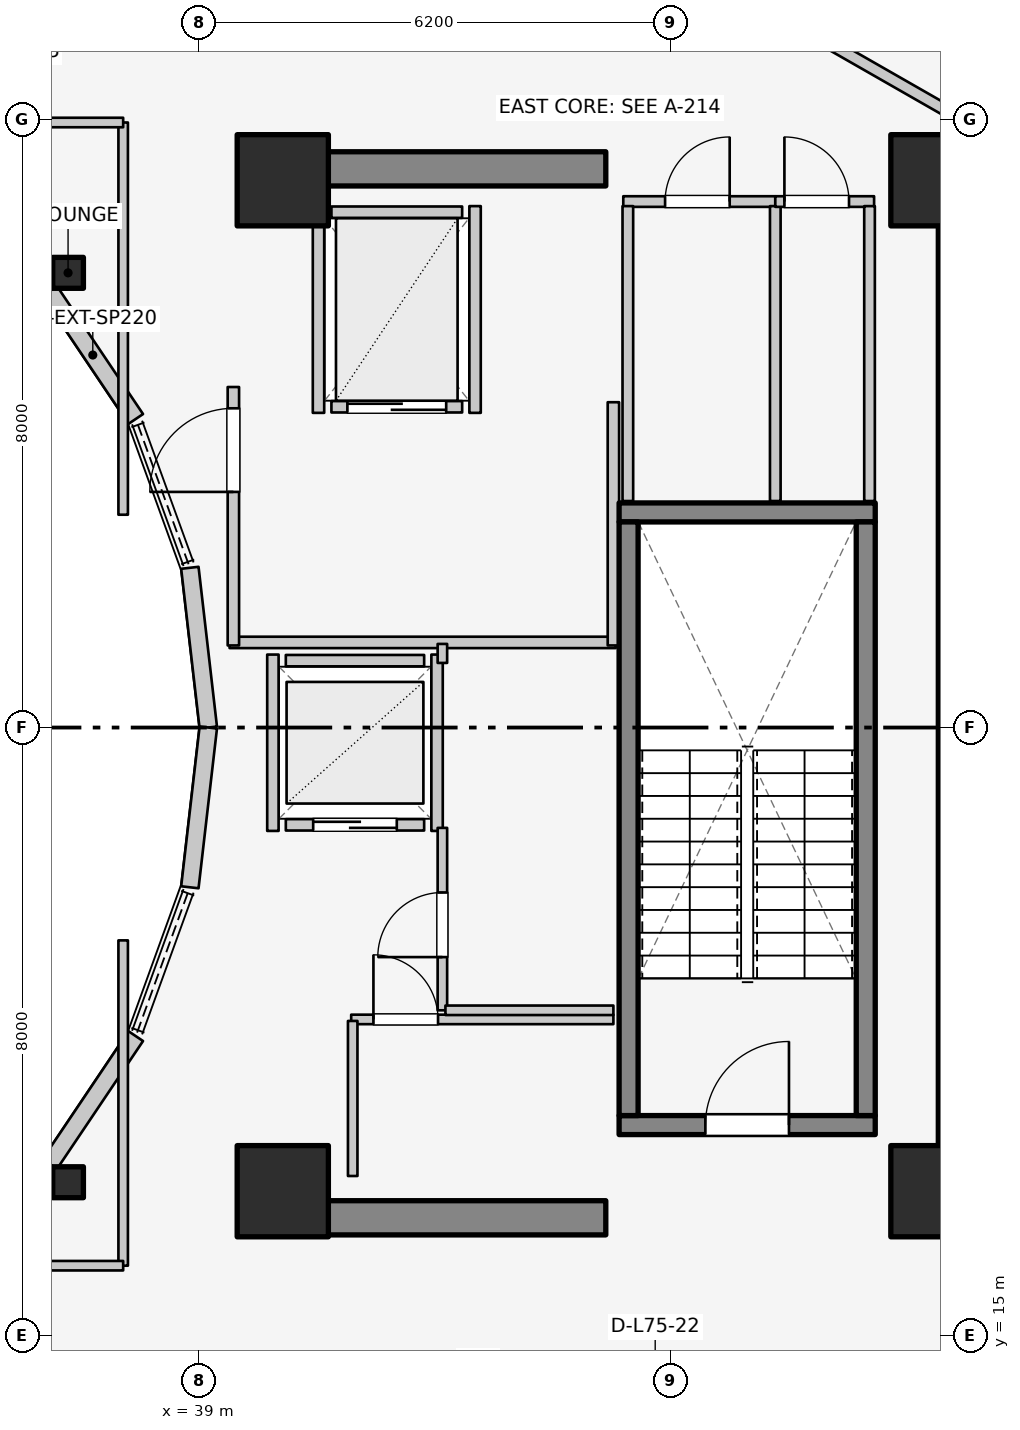
"""IFC4 building model, lengths in metres.
Left out: names, types, materials, properties, quantities, classifications, styles, units other than length and angle.
Written with IfcOpenShell. Run it as: python <this file> out.ifc"""

import sys

from ifc_helpers import new_model, si_unit, direction, frame, frame_2d, origin, origin_2d, place, context, subcontext, project, spatial, rectangle, i_section, extrude, element, fill, save


model = new_model("IFC4")
c1 = context("Model", 3, precision=1e-05, world=origin(), true_north=direction((0.0, 1.0)))
c2 = subcontext(c1, "Body", "Model", "MODEL_VIEW")
j1 = project(units=[si_unit("LENGTHUNIT", "METRE"), si_unit("PLANEANGLEUNIT", "RADIAN")], contexts=[c1])
p1 = place(None, origin())
s1 = spatial("IfcSite", under=j1, at=p1, CompositionType="ELEMENT")
p2 = place(p1, origin())
s2 = spatial("IfcBuilding", under=s1, at=p2, CompositionType="ELEMENT")
p3 = place(p2, frame((0.0, 0.0, 246.0)))
s3 = spatial("IfcBuildingStorey", under=s2, at=p3, CompositionType="ELEMENT", Elevation=246.0)
p4 = place(p3, frame((48.95, 17.05, 0.0), z_axis=(0.0, 0.0, 1.0), x_axis=(0.0, 1.0, 0.0)))
e1 = element("IfcWall", 1, at=p4, inside=s3, PredefinedType="SHEAR", context=c2, shape_type="SweptSolid", body=[
    extrude(rectangle(XDim=12.8, YDim=0.45, at=frame_2d((6.4, 0.0))), origin(), (0.0, 0.0, 1.0), 3.6),
])
for number, where, z_axis, x_axis in (
    (2, (39.85, 16.55, 0.0), (0.0, 0.0, 1.0), (1.0, 0.0, 0.0)),
    (3, (39.85, 30.35, 0.0), (0.0, 0.0, 1.0), (1.0, 0.0, 0.0)),
):
    element("IfcWall", number, at=place(p3, frame(where, z_axis=z_axis, x_axis=x_axis)), inside=s3, PredefinedType="SHEAR", context=c2, shape_type="SweptSolid", body=[
        extrude(rectangle(XDim=4.5, YDim=0.45, at=frame_2d((2.25, 0.0))), origin(), (0.0, 0.0, 1.0), 3.6),
    ])
p5 = place(p3, frame((44.525, 17.77, 0.0), z_axis=(0.0, 0.0, 1.0), x_axis=(1.0, 0.0, 0.0)))
e4 = element("IfcWall", 4, at=p5, inside=s3, PredefinedType="SOLIDWALL", context=c2, shape_type="SweptSolid", body=[
    extrude(rectangle(XDim=3.37, YDim=0.25, at=frame_2d((1.685, 0.0))), origin(), (0.0, 0.0, 1.0), 3.6),
])
p6 = place(p5, frame((1.135, 0.0, 0.0)))
e5 = element("IfcOpeningElement", 5, at=p6, cuts=e4, PredefinedType="OPENING", context=c2, shape_type="SweptSolid", body=[
    extrude(rectangle(XDim=1.1, YDim=2.1, at=frame_2d((0.55, 1.05))), frame((0.0, 0.135, 0.0), z_axis=(0.0, -1.0, 0.0), x_axis=(1.0, 0.0, 0.0)), (0.0, 0.0, 1.0), 0.27),
])
p7 = place(p3, frame((44.525, 25.83, 0.0), z_axis=(0.0, 0.0, 1.0), x_axis=(1.0, 0.0, 0.0)))
e6 = element("IfcWall", 6, at=p7, inside=s3, PredefinedType="SOLIDWALL", context=c2, shape_type="SweptSolid", body=[
    extrude(rectangle(XDim=3.37, YDim=0.25, at=frame_2d((1.685, 0.0))), origin(), (0.0, 0.0, 1.0), 3.6),
])
for number, where, z_axis, x_axis in (
    (7, (44.65, 17.895, 0.0), (0.0, 0.0, 1.0), (0.0, 1.0, 0.0)),
    (8, (47.77, 17.895, 0.0), (0.0, 0.0, 1.0), (0.0, 1.0, 0.0)),
):
    element("IfcWall", number, at=place(p3, frame(where, z_axis=z_axis, x_axis=x_axis)), inside=s3, PredefinedType="SOLIDWALL", context=c2, shape_type="SweptSolid", body=[
        extrude(rectangle(XDim=7.81, YDim=0.25, at=frame_2d((3.905, 0.0))), origin(), (0.0, 0.0, 1.0), 3.6),
    ])
for number, where, z_axis, x_axis in (
    (9, (40.1, 16.9, 0.0), (0.0, 0.0, 1.0), (1.0, 0.0, 0.0)),
    (10, (48.7, 16.9, 0.0), (0.0, 0.0, 1.0), (1.0, 0.0, 0.0)),
    (11, (48.7, 30.2, 0.0), (0.0, 0.0, 1.0), (1.0, 0.0, 0.0)),
    (12, (40.1, 30.2, 0.0), (0.0, 0.0, 1.0), (1.0, 0.0, 0.0)),
):
    element("IfcColumn", number, at=place(p3, frame(where, z_axis=z_axis, x_axis=x_axis)), inside=s3, PredefinedType="COLUMN", context=c2, shape_type="SweptSolid", body=[
        extrude(rectangle(XDim=1.2, YDim=1.2, at=origin_2d()), origin(), (0.0, 0.0, 1.0), 3.6),
    ])
for number, where, z_axis, x_axis in (
    (13, (37.275, 28.982, 0.0), (0.0, 0.0, 1.0), (1.0, 0.0, 0.0)),
    (14, (37.275, 17.018, 0.0), (0.0, 0.0, 1.0), (1.0, 0.0, 0.0)),
):
    element("IfcColumn", number, at=place(p3, frame(where, z_axis=z_axis, x_axis=x_axis)), inside=s3, PredefinedType="COLUMN", context=c2, shape_type="SweptSolid", body=[
        extrude(i_section(OverallWidth=0.404, OverallDepth=0.407, WebThickness=0.027, FlangeThickness=0.044, FilletRadius=0.025, at=origin_2d()), origin(), (0.0, 0.0, 1.0), 3.6),
    ])
p8 = place(p3, frame((39.12, 23.0, 0.0), z_axis=(0.0, 0.0, 1.0), x_axis=(-0.114711713601, 0.993398823617, 0.0)))
e15 = element("IfcWall", 15, at=p8, inside=s3, PredefinedType="STANDARD", context=c2, shape_type="SweptSolid", body=[
    extrude(rectangle(XDim=2.115, YDim=0.23, at=frame_2d((1.058, 0.0))), origin(), (0.0, 0.0, 1.0), 3.28),
])
p9 = place(p3, frame((38.166, 27.06, 0.0), z_axis=(0.0, 0.0, 1.0), x_axis=(-0.558197800898, 0.829707909492, 0.0)))
e16 = element("IfcWall", 16, at=p9, inside=s3, PredefinedType="STANDARD", context=c2, shape_type="SweptSolid", body=[
    extrude(rectangle(XDim=2.027, YDim=0.23, at=frame_2d((1.013, 0.0))), origin(), (0.0, 0.0, 1.0), 2.6),
])
for number, where, z_axis, x_axis in (
    (17, (37.035, 28.742, 0.0), (0.0, 0.0, 1.0), (-0.753, 0.659, 0.0)),
    (18, (35.56, 15.968, 0.0), (0.0, 0.0, 1.0), (0.753, 0.659, 0.0)),
):
    element("IfcWall", number, at=place(p3, frame(where, z_axis=z_axis, x_axis=x_axis)), inside=s3, PredefinedType="STANDARD", context=c2, shape_type="SweptSolid", body=[
        extrude(rectangle(XDim=1.959, YDim=0.23, at=frame_2d((0.98, 0.0))), origin(), (0.0, 0.0, 1.0), 2.6),
    ])
p10 = place(p3, frame((37.035, 17.258, 0.0), z_axis=(0.0, 0.0, 1.0), x_axis=(0.558197800898, 0.829707909492, 0.0)))
e19 = element("IfcWall", 19, at=p10, inside=s3, PredefinedType="STANDARD", context=c2, shape_type="SweptSolid", body=[
    extrude(rectangle(XDim=2.027, YDim=0.23, at=frame_2d((1.013, 0.0))), origin(), (0.0, 0.0, 1.0), 2.6),
])
p11 = place(p3, frame((38.877, 20.898, 0.0), z_axis=(0.0, 0.0, 1.0), x_axis=(0.114711713601, 0.993398823617, 0.0)))
e20 = element("IfcWall", 20, at=p11, inside=s3, PredefinedType="STANDARD", context=c2, shape_type="SweptSolid", body=[
    extrude(rectangle(XDim=2.115, YDim=0.23, at=frame_2d((1.058, 0.0))), origin(), (0.0, 0.0, 1.0), 3.28),
])
p12 = place(p3, frame((50.761, 31.829, 0.0), z_axis=(0.0, 0.0, 1.0), x_axis=(-0.759587504333, 0.650405122413, 0.0)))
e21 = element("IfcWall", 21, at=p12, inside=s3, PredefinedType="STANDARD", context=c2, shape_type="SweptSolid", body=[
    extrude(rectangle(XDim=4.217, YDim=0.26, at=frame_2d((2.109, 0.0))), origin(), (0.0, 0.0, 1.0), 3.29),
])
p13 = place(p12, frame((1.359, 0.0, 0.75)))
e22 = element("IfcOpeningElement", 22, at=p13, cuts=e21, PredefinedType="OPENING", context=c2, shape_type="SweptSolid", body=[
    extrude(rectangle(XDim=1.5, YDim=1.6, at=frame_2d((0.75, 0.8))), frame((0.0, 0.14, 0.0), z_axis=(0.0, -1.0, 0.0), x_axis=(1.0, 0.0, 0.0)), (0.0, 0.0, 1.0), 0.28),
])
p14 = place(p3, frame((40.14, 21.72, 0.0), z_axis=(0.0, 0.0, 1.0), x_axis=(1.0, 0.0, 0.0)))
e23 = element("IfcWall", 23, at=p14, inside=s3, PredefinedType="SOLIDWALL", context=c2, shape_type="SweptSolid", body=[
    extrude(rectangle(XDim=1.82, YDim=0.15, at=frame_2d((0.91, 0.0))), origin(), (0.0, 0.0, 1.0), 2.62),
])
p15 = place(p14, frame((0.36, 0.0, 0.0)))
e24 = element("IfcOpeningElement", 24, at=p15, cuts=e23, PredefinedType="OPENING", context=c2, shape_type="SweptSolid", body=[
    extrude(rectangle(XDim=1.1, YDim=2.1, at=frame_2d((0.55, 1.05))), frame((0.0, 0.085, 0.0), z_axis=(0.0, -1.0, 0.0), x_axis=(1.0, 0.0, 0.0)), (0.0, 0.0, 1.0), 0.17),
])
p16 = place(p3, frame((40.14, 23.88, 0.0), z_axis=(0.0, 0.0, 1.0), x_axis=(1.0, 0.0, 0.0)))
e25 = element("IfcWall", 25, at=p16, inside=s3, PredefinedType="SOLIDWALL", context=c2, shape_type="SweptSolid", body=[
    extrude(rectangle(XDim=1.82, YDim=0.15, at=frame_2d((0.91, 0.0))), origin(), (0.0, 0.0, 1.0), 2.62),
])
p17 = place(p3, frame((39.97, 21.64, 0.0), z_axis=(0.0, 0.0, 1.0), x_axis=(0.0, 1.0, 0.0)))
e26 = element("IfcWall", 26, at=p17, inside=s3, PredefinedType="SOLIDWALL", context=c2, shape_type="SweptSolid", body=[
    extrude(rectangle(XDim=2.32, YDim=0.15, at=frame_2d((1.16, 0.0))), origin(), (0.0, 0.0, 1.0), 2.62),
])
p18 = place(p3, frame((42.13, 21.64, 0.0), z_axis=(0.0, 0.0, 1.0), x_axis=(0.0, 1.0, 0.0)))
e27 = element("IfcWall", 27, at=p18, inside=s3, PredefinedType="SOLIDWALL", context=c2, shape_type="SweptSolid", body=[
    extrude(rectangle(XDim=2.32, YDim=0.15, at=frame_2d((1.16, 0.0))), origin(), (0.0, 0.0, 1.0), 3.295),
])
p19 = place(p3, frame((40.74, 27.22, 0.0), z_axis=(0.0, 0.0, 1.0), x_axis=(1.0, 0.0, 0.0)))
e28 = element("IfcWall", 28, at=p19, inside=s3, PredefinedType="SOLIDWALL", context=c2, shape_type="SweptSolid", body=[
    extrude(rectangle(XDim=1.72, YDim=0.15, at=frame_2d((0.86, 0.0))), origin(), (0.0, 0.0, 1.0), 3.295),
])
p20 = place(p19, frame((0.21, 0.0, 0.0)))
e29 = element("IfcOpeningElement", 29, at=p20, cuts=e28, PredefinedType="OPENING", context=c2, shape_type="SweptSolid", body=[
    extrude(rectangle(XDim=1.3, YDim=2.1, at=frame_2d((0.65, 1.05))), frame((0.0, 0.085, 0.0), z_axis=(0.0, -1.0, 0.0), x_axis=(1.0, 0.0, 0.0)), (0.0, 0.0, 1.0), 0.17),
])
p21 = place(p3, frame((40.74, 29.78, 0.0), z_axis=(0.0, 0.0, 1.0), x_axis=(1.0, 0.0, 0.0)))
e30 = element("IfcWall", 30, at=p21, inside=s3, PredefinedType="SOLIDWALL", context=c2, shape_type="SweptSolid", body=[
    extrude(rectangle(XDim=1.72, YDim=0.15, at=frame_2d((0.86, 0.0))), origin(), (0.0, 0.0, 1.0), 3.295),
])
for number, where, z_axis, x_axis in (
    (31, (40.57, 27.14, 0.0), (0.0, 0.0, 1.0), (0.0, 1.0, 0.0)),
    (32, (42.63, 27.14, 0.0), (0.0, 0.0, 1.0), (0.0, 1.0, 0.0)),
):
    element("IfcWall", number, at=place(p3, frame(where, z_axis=z_axis, x_axis=x_axis)), inside=s3, PredefinedType="SOLIDWALL", context=c2, shape_type="SweptSolid", body=[
        extrude(rectangle(XDim=2.72, YDim=0.15, at=frame_2d((1.36, 0.0))), origin(), (0.0, 0.0, 1.0), 3.295),
    ])
p22 = place(p3, frame((39.4, 24.12, 0.0), z_axis=(0.0, 0.0, 1.0), x_axis=(1.0, 0.0, 0.0)))
e33 = element("IfcWall", 33, at=p22, inside=s3, PredefinedType="PARTITIONING", context=c2, shape_type="SweptSolid", body=[
    extrude(rectangle(XDim=5.08, YDim=0.15, at=frame_2d((2.54, 0.0))), origin(), (0.0, 0.0, 1.0), 2.62),
])
p23 = place(p3, frame((44.45, 24.08, 0.0), z_axis=(0.0, 0.0, 1.0), x_axis=(0.0, 1.0, 0.0)))
e34 = element("IfcWall", 34, at=p23, inside=s3, PredefinedType="PARTITIONING", context=c2, shape_type="SweptSolid", body=[
    extrude(rectangle(XDim=3.2, YDim=0.15, at=frame_2d((1.6, 0.0))), origin(), (0.0, 0.0, 1.0), 3.295),
])
p24 = place(p3, frame((39.45, 24.08, 0.0), z_axis=(0.0, 0.0, 1.0), x_axis=(0.0, 1.0, 0.0)))
e35 = element("IfcWall", 35, at=p24, inside=s3, PredefinedType="PARTITIONING", context=c2, shape_type="SweptSolid", body=[
    extrude(rectangle(XDim=3.4, YDim=0.15, at=frame_2d((1.7, 0.0))), origin(), (0.0, 0.0, 1.0), 3.295),
])
p25 = place(p24, frame((2.02, 0.0, 0.0)))
e36 = element("IfcOpeningElement", 36, at=p25, cuts=e35, PredefinedType="OPENING", context=c2, shape_type="SweptSolid", body=[
    extrude(rectangle(XDim=1.1, YDim=2.1, at=frame_2d((0.55, 1.05))), frame((0.0, 0.085, 0.0), z_axis=(0.0, -1.0, 0.0), x_axis=(1.0, 0.0, 0.0)), (0.0, 0.0, 1.0), 0.17),
])
p26 = place(p3, frame((41.0, 19.16, 0.0), z_axis=(0.0, 0.0, 1.0), x_axis=(1.0, 0.0, 0.0)))
e37 = element("IfcWall", 37, at=p26, inside=s3, PredefinedType="PARTITIONING", context=c2, shape_type="SweptSolid", body=[
    extrude(rectangle(XDim=3.45, YDim=0.125, at=frame_2d((1.725, 0.0))), origin(), (0.0, 0.0, 1.0), 2.62),
])
p27 = place(p26, frame((0.293, 0.0, 0.0)))
e38 = element("IfcOpeningElement", 38, at=p27, cuts=e37, PredefinedType="OPENING", context=c2, shape_type="SweptSolid", body=[
    extrude(rectangle(XDim=0.85, YDim=2.05, at=frame_2d((0.425, 1.025))), frame((0.0, 0.073, 0.0), z_axis=(0.0, -1.0, 0.0), x_axis=(1.0, 0.0, 0.0)), (0.0, 0.0, 1.0), 0.145),
])
p28 = place(p3, frame((41.02, 17.1, 0.0), z_axis=(0.0, 0.0, 1.0), x_axis=(0.0, 1.0, 0.0)))
e39 = element("IfcWall", 39, at=p28, inside=s3, PredefinedType="PARTITIONING", context=c2, shape_type="SweptSolid", body=[
    extrude(rectangle(XDim=2.04, YDim=0.125, at=frame_2d((1.02, 0.0))), origin(), (0.0, 0.0, 1.0), 3.295),
])
p29 = place(p3, frame((42.2, 19.28, 0.0), z_axis=(0.0, 0.0, 1.0), x_axis=(0.0, 1.0, 0.0)))
e40 = element("IfcWall", 40, at=p29, inside=s3, PredefinedType="PARTITIONING", context=c2, shape_type="SweptSolid", body=[
    extrude(rectangle(XDim=2.4, YDim=0.125, at=frame_2d((1.2, 0.0))), origin(), (0.0, 0.0, 1.0), 3.295),
])
p30 = place(p29, frame((0.7, 0.0, 0.0)))
e41 = element("IfcOpeningElement", 41, at=p30, cuts=e40, PredefinedType="OPENING", context=c2, shape_type="SweptSolid", body=[
    extrude(rectangle(XDim=0.85, YDim=2.05, at=frame_2d((0.425, 1.025))), frame((0.0, 0.073, 0.0), z_axis=(0.0, -1.0, 0.0), x_axis=(1.0, 0.0, 0.0)), (0.0, 0.0, 1.0), 0.145),
])
p31 = place(p3, frame((42.2, 23.85, 0.0), z_axis=(0.0, 0.0, 1.0), x_axis=(0.0, 1.0, 0.0)))
e42 = element("IfcWall", 42, at=p31, inside=s3, PredefinedType="PARTITIONING", context=c2, shape_type="SweptSolid", body=[
    extrude(rectangle(XDim=0.25, YDim=0.125, at=frame_2d((0.125, 0.0))), origin(), (0.0, 0.0, 1.0), 3.295),
])
p32 = place(p3, frame((42.24, 19.28, 0.0), z_axis=(0.0, 0.0, 1.0), x_axis=(1.0, 0.0, 0.0)))
e43 = element("IfcWall", 43, at=p32, inside=s3, PredefinedType="PARTITIONING", context=c2, shape_type="SweptSolid", body=[
    extrude(rectangle(XDim=2.21, YDim=0.125, at=frame_2d((1.105, 0.0))), origin(), (0.0, 0.0, 1.0), 2.62),
])
p33 = place(p3, frame((44.58, 29.92, 0.0), z_axis=(0.0, 0.0, 1.0), x_axis=(1.0, 0.0, 0.0)))
e44 = element("IfcWall", 44, at=p33, inside=s3, PredefinedType="PLUMBINGWALL", context=c2, shape_type="SweptSolid", body=[
    extrude(rectangle(XDim=2.0, YDim=0.14, at=frame_2d((1.0, 0.0))), origin(), (0.0, 0.0, 1.0), 3.295),
])
p34 = place(p33, frame((0.55, 0.0, 0.0)))
e45 = element("IfcOpeningElement", 45, at=p34, cuts=e44, PredefinedType="OPENING", context=c2, shape_type="SweptSolid", body=[
    extrude(rectangle(XDim=0.85, YDim=2.05, at=frame_2d((0.425, 1.025))), frame((0.0, 0.08, 0.0), z_axis=(0.0, -1.0, 0.0), x_axis=(1.0, 0.0, 0.0)), (0.0, 0.0, 1.0), 0.16),
])
for number, where, z_axis, x_axis in (
    (46, (44.64, 25.98, 0.0), (0.0, 0.0, 1.0), (0.0, 1.0, 0.0)),
    (47, (46.58, 25.98, 0.0), (0.0, 0.0, 1.0), (0.0, 1.0, 0.0)),
):
    element("IfcWall", number, at=place(p3, frame(where, z_axis=z_axis, x_axis=x_axis)), inside=s3, PredefinedType="PLUMBINGWALL", context=c2, shape_type="SweptSolid", body=[
        extrude(rectangle(XDim=3.88, YDim=0.14, at=frame_2d((1.94, 0.0))), origin(), (0.0, 0.0, 1.0), 3.295),
    ])
p35 = place(p3, frame((46.58, 29.92, 0.0), z_axis=(0.0, 0.0, 1.0), x_axis=(1.0, 0.0, 0.0)))
e48 = element("IfcWall", 48, at=p35, inside=s3, PredefinedType="PLUMBINGWALL", context=c2, shape_type="SweptSolid", body=[
    extrude(rectangle(XDim=1.3, YDim=0.14, at=frame_2d((0.65, 0.0))), origin(), (0.0, 0.0, 1.0), 3.295),
])
p36 = place(p35, frame((0.12, 0.0, 0.0)))
e49 = element("IfcOpeningElement", 49, at=p36, cuts=e48, PredefinedType="OPENING", context=c2, shape_type="SweptSolid", body=[
    extrude(rectangle(XDim=0.85, YDim=2.05, at=frame_2d((0.425, 1.025))), frame((0.0, 0.08, 0.0), z_axis=(0.0, -1.0, 0.0), x_axis=(1.0, 0.0, 0.0)), (0.0, 0.0, 1.0), 0.16),
])
p37 = place(p3, frame((47.82, 25.98, 0.0), z_axis=(0.0, 0.0, 1.0), x_axis=(0.0, 1.0, 0.0)))
e50 = element("IfcWall", 50, at=p37, inside=s3, PredefinedType="PLUMBINGWALL", context=c2, shape_type="SweptSolid", body=[
    extrude(rectangle(XDim=3.88, YDim=0.14, at=frame_2d((1.94, 0.0))), origin(), (0.0, 0.0, 1.0), 3.295),
])
p38 = place(p3, frame((35.55, 30.015, 0.0), z_axis=(0.0, 0.0, 1.0), x_axis=(0.522763432117, 0.852477796802, 0.0)))
e51 = element("IfcWall", 51, at=p38, inside=s3, PredefinedType="PARTITIONING", context=c2, shape_type="SweptSolid", body=[
    extrude(rectangle(XDim=3.269, YDim=0.125, at=frame_2d((1.635, 0.0))), origin(), (0.0, 0.0, 1.0), 2.672),
])
p39 = place(p3, frame((35.55, 15.985, 0.0), z_axis=(0.0, 0.0, 1.0), x_axis=(0.52592395012, -0.850531597702, 0.0)))
e52 = element("IfcWall", 52, at=p39, inside=s3, PredefinedType="PARTITIONING", context=c2, shape_type="SweptSolid", body=[
    extrude(rectangle(XDim=2.869, YDim=0.125, at=frame_2d((1.435, 0.0))), origin(), (0.0, 0.0, 1.0), 2.672),
])
p40 = place(p3, frame((38.0, 25.8, 0.0), z_axis=(0.0, 0.0, 1.0), x_axis=(0.0, 1.0, 0.0)))
e53 = element("IfcWall", 53, at=p40, inside=s3, PredefinedType="PARTITIONING", context=c2, shape_type="SweptSolid", body=[
    extrude(rectangle(XDim=5.16, YDim=0.125, at=frame_2d((2.58, 0.0))), origin(), (0.0, 0.0, 1.0), 2.672),
])
p41 = place(p3, frame((35.4, 30.96, 0.0), z_axis=(0.0, 0.0, 1.0), x_axis=(1.0, 0.0, 0.0)))
e54 = element("IfcWall", 54, at=p41, inside=s3, PredefinedType="PARTITIONING", context=c2, shape_type="SweptSolid", body=[
    extrude(rectangle(XDim=2.6, YDim=0.125, at=frame_2d((1.3, 0.0))), origin(), (0.0, 0.0, 1.0), 2.816),
])
p42 = place(p3, frame((38.0, 15.92, 0.0), z_axis=(0.0, 0.0, 1.0), x_axis=(0.0, 1.0, 0.0)))
e55 = element("IfcWall", 55, at=p42, inside=s3, PredefinedType="PARTITIONING", context=c2, shape_type="SweptSolid", body=[
    extrude(rectangle(XDim=4.28, YDim=0.125, at=frame_2d((2.14, 0.0))), origin(), (0.0, 0.0, 1.0), 2.672),
])
p43 = place(p3, frame((35.4, 15.92, 0.0), z_axis=(0.0, 0.0, 1.0), x_axis=(1.0, 0.0, 0.0)))
e56 = element("IfcWall", 56, at=p43, inside=s3, PredefinedType="PARTITIONING", context=c2, shape_type="SweptSolid", body=[
    extrude(rectangle(XDim=2.6, YDim=0.125, at=frame_2d((1.3, 0.0))), origin(), (0.0, 0.0, 1.0), 2.672),
])
p44 = place(p3, frame((46.757, 32.305, 0.0), z_axis=(0.0, 0.0, 1.0), x_axis=(0.867991349648, -0.496579315857, 0.0)))
e57 = element("IfcWall", 57, at=p44, inside=s3, PredefinedType="PARTITIONING", context=c2, shape_type="SweptSolid", body=[
    extrude(rectangle(XDim=2.567, YDim=0.15, at=frame_2d((1.283, 0.0))), origin(), (0.0, 0.0, 1.0), 2.66),
])
p45 = place(p6, origin())
e58 = element("IfcDoor", 58, at=p45, inside=s3, OperationType="SINGLE_SWING_RIGHT", PredefinedType="DOOR", context=c2, shape_type="SweptSolid", body=[
    extrude(rectangle(XDim=1.1, YDim=2.1, at=frame_2d((0.55, 1.05))), frame((0.0, 0.025, 0.0), z_axis=(0.0, -1.0, 0.0), x_axis=(1.0, 0.0, 0.0)), (0.0, 0.0, 1.0), 0.05),
])
fill(e5, e58)
p46 = place(p15, origin())
e59 = element("IfcDoor", 59, at=p46, inside=s3, OperationType="DOUBLE_DOOR_SLIDING", PredefinedType="DOOR", context=c2, shape_type="SweptSolid", body=[
    extrude(rectangle(XDim=1.1, YDim=2.1, at=frame_2d((0.55, 1.05))), frame((0.0, 0.025, 0.0), z_axis=(0.0, -1.0, 0.0), x_axis=(1.0, 0.0, 0.0)), (0.0, 0.0, 1.0), 0.05),
])
fill(e24, e59)
p47 = place(p20, origin())
e60 = element("IfcDoor", 60, at=p47, inside=s3, OperationType="DOUBLE_DOOR_SLIDING", PredefinedType="DOOR", context=c2, shape_type="SweptSolid", body=[
    extrude(rectangle(XDim=1.3, YDim=2.1, at=frame_2d((0.65, 1.05))), frame((0.0, 0.025, 0.0), z_axis=(0.0, -1.0, 0.0), x_axis=(1.0, 0.0, 0.0)), (0.0, 0.0, 1.0), 0.05),
])
fill(e29, e60)
p48 = place(p25, origin())
e61 = element("IfcDoor", 61, at=p48, inside=s3, OperationType="SINGLE_SWING_LEFT", PredefinedType="DOOR", context=c2, shape_type="SweptSolid", body=[
    extrude(rectangle(XDim=1.1, YDim=2.1, at=frame_2d((0.55, 1.05))), frame((0.0, 0.025, 0.0), z_axis=(0.0, -1.0, 0.0), x_axis=(1.0, 0.0, 0.0)), (0.0, 0.0, 1.0), 0.05),
])
fill(e36, e61)
p49 = place(p27, origin())
e62 = element("IfcDoor", 62, at=p49, inside=s3, OperationType="SINGLE_SWING_LEFT", PredefinedType="DOOR", context=c2, shape_type="SweptSolid", body=[
    extrude(rectangle(XDim=0.85, YDim=2.05, at=frame_2d((0.425, 1.025))), frame((0.0, 0.025, 0.0), z_axis=(0.0, -1.0, 0.0), x_axis=(1.0, 0.0, 0.0)), (0.0, 0.0, 1.0), 0.05),
])
fill(e38, e62)
p50 = place(p30, origin())
e63 = element("IfcDoor", 63, at=p50, inside=s3, OperationType="SINGLE_SWING_LEFT", PredefinedType="DOOR", context=c2, shape_type="SweptSolid", body=[
    extrude(rectangle(XDim=0.85, YDim=2.05, at=frame_2d((0.425, 1.025))), frame((0.0, 0.025, 0.0), z_axis=(0.0, -1.0, 0.0), x_axis=(1.0, 0.0, 0.0)), (0.0, 0.0, 1.0), 0.05),
])
fill(e41, e63)
p51 = place(p34, origin())
e64 = element("IfcDoor", 64, at=p51, inside=s3, OperationType="SINGLE_SWING_RIGHT", PredefinedType="DOOR", context=c2, shape_type="SweptSolid", body=[
    extrude(rectangle(XDim=0.85, YDim=2.05, at=frame_2d((0.425, 1.025))), frame((0.0, 0.025, 0.0), z_axis=(0.0, -1.0, 0.0), x_axis=(1.0, 0.0, 0.0)), (0.0, 0.0, 1.0), 0.05),
])
fill(e45, e64)
p52 = place(p36, origin())
e65 = element("IfcDoor", 65, at=p52, inside=s3, OperationType="SINGLE_SWING_LEFT", PredefinedType="DOOR", context=c2, shape_type="SweptSolid", body=[
    extrude(rectangle(XDim=0.85, YDim=2.05, at=frame_2d((0.425, 1.025))), frame((0.0, 0.025, 0.0), z_axis=(0.0, -1.0, 0.0), x_axis=(1.0, 0.0, 0.0)), (0.0, 0.0, 1.0), 0.05),
])
fill(e49, e65)
save(model, sys.argv[1])
